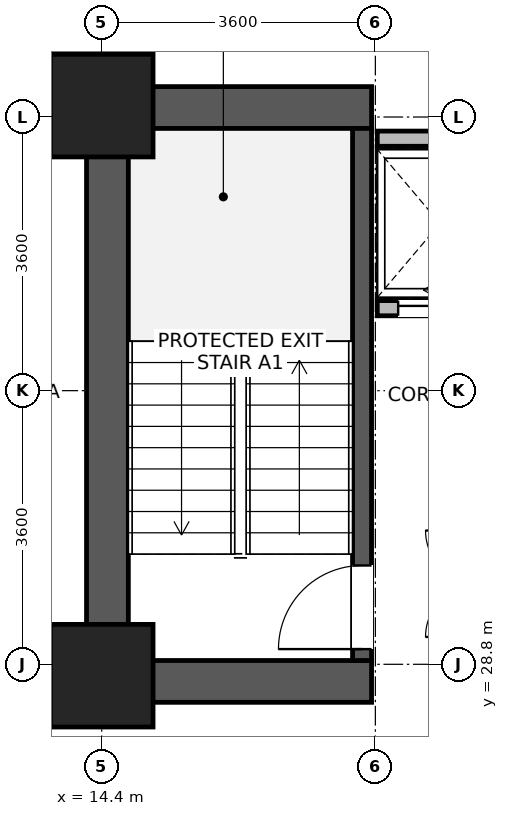
"""IFC4 building model, lengths in metres.
Left out: names, types, materials, properties, quantities, classifications, styles, units other than length and angle.
Written with IfcOpenShell. Run it as: python <this file> out.ifc"""

import sys

from ifc_helpers import new_model, si_unit, direction, frame, frame_2d, origin, origin_2d, place, context, subcontext, project, spatial, rectangle, extrude, source, transform, mapped, element, fill, save


model = new_model("IFC4")
c1 = context("Model", 3, precision=1e-05, world=origin(), true_north=direction((0.0, 1.0)))
c2 = subcontext(c1, "Body", "Model", "MODEL_VIEW")
j1 = project(units=[si_unit("LENGTHUNIT", "METRE"), si_unit("PLANEANGLEUNIT", "RADIAN")], contexts=[c1])
p1 = place(None, origin())
s1 = spatial("IfcSite", under=j1, at=p1, CompositionType="ELEMENT")
p2 = place(p1, origin())
s2 = spatial("IfcBuilding", under=s1, at=p2, CompositionType="ELEMENT")
p3 = place(p2, frame((0.0, 0.0, 40.1)))
s3 = spatial("IfcBuildingStorey", under=s2, at=p3, CompositionType="ELEMENT", Elevation=40.1)
p4 = place(p3, frame((14.475, 28.3, 0.0), z_axis=(0.0, 0.0, 1.0), x_axis=(0.0, 1.0, 0.0)))
e1 = element("IfcWall", 1, at=p4, inside=s3, PredefinedType="SHEAR", context=c2, shape_type="SweptSolid", body=[
    extrude(rectangle(XDim=8.1, YDim=0.55, at=frame_2d((4.05, 0.0))), origin(), (0.0, 0.0, 1.0), 3.45),
])
for number, where, z_axis, x_axis in (
    (2, (14.75, 28.575, 0.0), (0.0, 0.0, 1.0), (1.0, 0.0, 0.0)),
    (3, (14.75, 36.125, 0.0), (0.0, 0.0, 1.0), (1.0, 0.0, 0.0)),
):
    element("IfcWall", number, at=place(p3, frame(where, z_axis=z_axis, x_axis=x_axis)), inside=s3, PredefinedType="SHEAR", context=c2, shape_type="SweptSolid", body=[
        extrude(rectangle(XDim=3.2, YDim=0.55, at=frame_2d((1.6, 0.0))), origin(), (0.0, 0.0, 1.0), 3.45),
    ])
p5 = place(p3, frame((17.825, 28.85, 0.0), z_axis=(0.0, 0.0, 1.0), x_axis=(0.0, 1.0, 0.0)))
e4 = element("IfcWall", 4, at=p5, inside=s3, PredefinedType="SHEAR", context=c2, shape_type="SweptSolid", body=[
    extrude(rectangle(XDim=7.0, YDim=0.25, at=frame_2d((3.5, 0.0))), origin(), (0.0, 0.0, 1.0), 3.45),
])
p6 = place(p5, frame((0.15, 0.0, 0.0)))
e5 = element("IfcOpeningElement", 5, at=p6, cuts=e4, PredefinedType="OPENING", context=c2, shape_type="SweptSolid", body=[
    extrude(rectangle(XDim=1.1, YDim=2.08, at=frame_2d((0.55, 1.04))), frame((0.0, 0.135, 0.0), z_axis=(0.0, -1.0, 0.0), x_axis=(1.0, 0.0, 0.0)), (0.0, 0.0, 1.0), 0.27),
])
m1 = source(origin(), c2, "Body", "SweptSolid", [
    extrude(rectangle(XDim=1.35, YDim=1.35, at=origin_2d()), origin(), (0.0, 0.0, 1.0), 3.7),
])
for number, where, z_axis, x_axis in (
    (6, (14.4, 28.65, 0.0), (0.0, 0.0, 1.0), (1.0, 0.0, 0.0)),
    (7, (14.4, 36.15, 0.0), (0.0, 0.0, 1.0), (1.0, 0.0, 0.0)),
):
    element("IfcColumn", number, at=place(p3, frame(where, z_axis=z_axis, x_axis=x_axis)), inside=s3, PredefinedType="COLUMN", context=c2, shape_type="MappedRepresentation", body=[
        mapped(m1, transform((0.0, 0.0, 0.0), x_axis=(1.0, 0.0, 0.0), y_axis=(0.0, 1.0, 0.0), z_axis=(0.0, 0.0, 1.0), scale=1.0)),
    ])
p7 = place(p3, frame((18.025, 33.485, 0.0), z_axis=(0.0, 0.0, 1.0), x_axis=(1.0, 0.0, 0.0)))
e8 = element("IfcWall", 8, at=p7, inside=s3, PredefinedType="PARTITIONING", context=c2, shape_type="SweptSolid", body=[
    extrude(rectangle(XDim=1.65, YDim=0.2, at=frame_2d((0.825, 0.0))), origin(), (0.0, 0.0, 1.0), 3.43),
])
p8 = place(p7, frame((0.275, 0.0, 0.0)))
e9 = element("IfcOpeningElement", 9, at=p8, cuts=e8, PredefinedType="OPENING", context=c2, shape_type="SweptSolid", body=[
    extrude(rectangle(XDim=1.1, YDim=2.12, at=frame_2d((0.55, 1.06))), frame((0.0, 0.11, 0.0), z_axis=(0.0, -1.0, 0.0), x_axis=(1.0, 0.0, 0.0)), (0.0, 0.0, 1.0), 0.22),
])
p9 = place(p3, frame((18.025, 35.715, 0.0), z_axis=(0.0, 0.0, 1.0), x_axis=(1.0, 0.0, 0.0)))
e10 = element("IfcWall", 10, at=p9, inside=s3, PredefinedType="PARTITIONING", context=c2, shape_type="SweptSolid", body=[
    extrude(rectangle(XDim=1.65, YDim=0.2, at=frame_2d((0.825, 0.0))), origin(), (0.0, 0.0, 1.0), 2.23),
])
p10 = place(p6, origin())
e11 = element("IfcDoor", 11, at=p10, inside=s3, OperationType="SINGLE_SWING_LEFT", PredefinedType="DOOR", context=c2, shape_type="SweptSolid", body=[
    extrude(rectangle(XDim=1.1, YDim=2.08, at=frame_2d((0.55, 1.04))), frame((0.0, 0.025, 0.0), z_axis=(0.0, -1.0, 0.0), x_axis=(1.0, 0.0, 0.0)), (0.0, 0.0, 1.0), 0.05),
])
fill(e5, e11)
p11 = place(p8, origin())
e12 = element("IfcDoor", 12, at=p11, inside=s3, OperationType="SLIDING_TO_LEFT", PredefinedType="DOOR", context=c2, shape_type="SweptSolid", body=[
    extrude(rectangle(XDim=1.1, YDim=2.12, at=frame_2d((0.55, 1.06))), frame((0.0, 0.025, 0.0), z_axis=(0.0, -1.0, 0.0), x_axis=(1.0, 0.0, 0.0)), (0.0, 0.0, 1.0), 0.05),
])
fill(e9, e12)
save(model, sys.argv[1])
